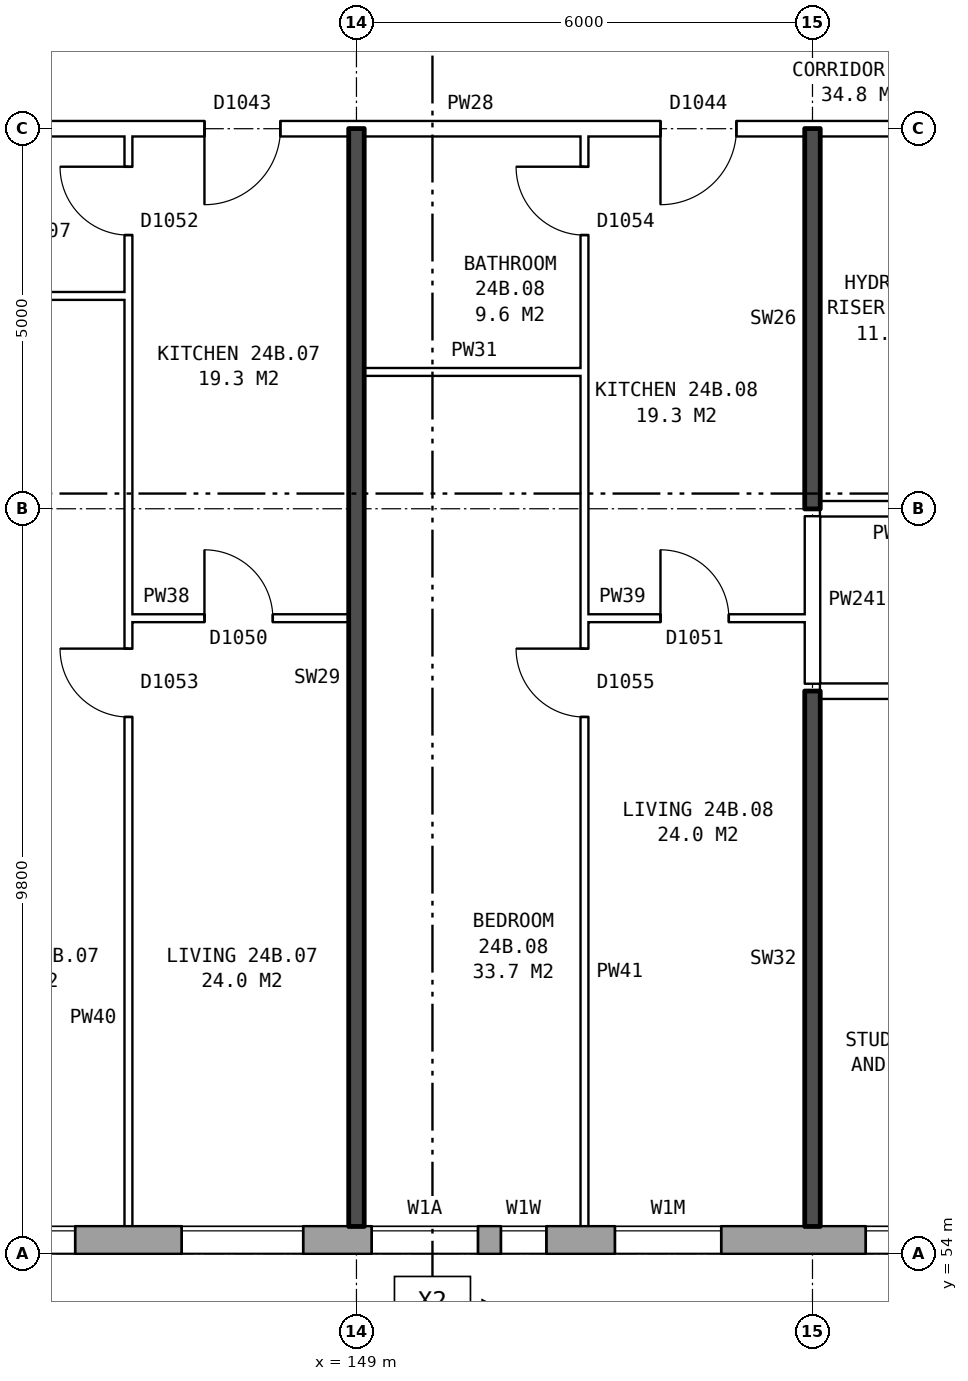
"""IFC4 building model, lengths in metres.
Left out: names, types, materials, properties, quantities, classifications, styles, units other than length and angle.
Written with IfcOpenShell. Run it as: python <this file> out.ifc"""

import sys

from ifc_helpers import new_model, si_unit, direction, frame, frame_2d, origin, place, context, subcontext, project, spatial, rectangle, extrude, element, fill, save


model = new_model("IFC4")
c1 = context("Model", 3, precision=1e-05, world=origin(), true_north=direction((0.0, 1.0)))
c2 = subcontext(c1, "Body", "Model", "MODEL_VIEW")
j1 = project(units=[si_unit("LENGTHUNIT", "METRE"), si_unit("PLANEANGLEUNIT", "RADIAN")], contexts=[c1])
p1 = place(None, origin())
s1 = spatial("IfcSite", under=j1, at=p1, CompositionType="ELEMENT")
p2 = place(p1, origin())
s2 = spatial("IfcBuilding", under=s1, at=p2, CompositionType="ELEMENT")
p3 = place(p2, frame((0.0, 0.0, 87.1)))
s3 = spatial("IfcBuildingStorey", under=s2, at=p3, CompositionType="ELEMENT", Elevation=87.1)
p4 = place(p3, frame((134.075, 54.18, 0.0), z_axis=(0.0, 0.0, 1.0), x_axis=(1.0, 0.0, 0.0)))
e1 = element("IfcWall", 1, at=p4, inside=s3, PredefinedType="STANDARD", context=c2, shape_type="SweptSolid", body=[
    extrude(rectangle(XDim=38.101, YDim=0.36, at=frame_2d((19.05, 0.0))), origin(), (0.0, 0.0, 1.0), 2.85),
])
p5 = place(p4, frame((0.625, 0.0, 0.8)))
e2 = element("IfcOpeningElement", 2, at=p5, cuts=e1, PredefinedType="OPENING", context=c2, shape_type="SweptSolid", body=[
    extrude(rectangle(XDim=1.6, YDim=1.8, at=frame_2d((0.8, 0.9))), frame((0.0, 0.19, 0.0), z_axis=(0.0, -1.0, 0.0), x_axis=(1.0, 0.0, 0.0)), (0.0, 0.0, 1.0), 0.38),
])
p6 = place(p4, frame((3.625, 0.0, 0.8)))
e3 = element("IfcOpeningElement", 3, at=p6, cuts=e1, PredefinedType="OPENING", context=c2, shape_type="SweptSolid", body=[
    extrude(rectangle(XDim=1.6, YDim=1.8, at=frame_2d((0.8, 0.9))), frame((0.0, 0.19, 0.0), z_axis=(0.0, -1.0, 0.0), x_axis=(1.0, 0.0, 0.0)), (0.0, 0.0, 1.0), 0.38),
])
p7 = place(p4, frame((6.625, 0.0, 0.8)))
e4 = element("IfcOpeningElement", 4, at=p7, cuts=e1, PredefinedType="OPENING", context=c2, shape_type="SweptSolid", body=[
    extrude(rectangle(XDim=1.6, YDim=1.8, at=frame_2d((0.8, 0.9))), frame((0.0, 0.19, 0.0), z_axis=(0.0, -1.0, 0.0), x_axis=(1.0, 0.0, 0.0)), (0.0, 0.0, 1.0), 0.38),
])
p8 = place(p4, frame((9.625, 0.0, 0.8)))
e5 = element("IfcOpeningElement", 5, at=p8, cuts=e1, PredefinedType="OPENING", context=c2, shape_type="SweptSolid", body=[
    extrude(rectangle(XDim=1.6, YDim=1.8, at=frame_2d((0.8, 0.9))), frame((0.0, 0.19, 0.0), z_axis=(0.0, -1.0, 0.0), x_axis=(1.0, 0.0, 0.0)), (0.0, 0.0, 1.0), 0.38),
])
p9 = place(p4, frame((12.625, 0.0, 0.8)))
e6 = element("IfcOpeningElement", 6, at=p9, cuts=e1, PredefinedType="OPENING", context=c2, shape_type="SweptSolid", body=[
    extrude(rectangle(XDim=1.6, YDim=1.8, at=frame_2d((0.8, 0.9))), frame((0.0, 0.19, 0.0), z_axis=(0.0, -1.0, 0.0), x_axis=(1.0, 0.0, 0.0)), (0.0, 0.0, 1.0), 0.38),
])
p10 = place(p4, frame((15.125, 0.0, 0.8)))
e7 = element("IfcOpeningElement", 7, at=p10, cuts=e1, PredefinedType="OPENING", context=c2, shape_type="SweptSolid", body=[
    extrude(rectangle(XDim=1.4, YDim=1.8, at=frame_2d((0.7, 0.9))), frame((0.0, 0.19, 0.0), z_axis=(0.0, -1.0, 0.0), x_axis=(1.0, 0.0, 0.0)), (0.0, 0.0, 1.0), 0.38),
])
p11 = place(p4, frame((18.325, 0.0, 0.15)))
e8 = element("IfcOpeningElement", 8, at=p11, cuts=e1, PredefinedType="OPENING", context=c2, shape_type="SweptSolid", body=[
    extrude(rectangle(XDim=1.4, YDim=1.2, at=frame_2d((0.7, 0.6))), frame((0.0, 0.19, 0.0), z_axis=(0.0, -1.0, 0.0), x_axis=(1.0, 0.0, 0.0)), (0.0, 0.0, 1.0), 0.38),
])
p12 = place(p4, frame((21.625, 0.0, 0.8)))
e9 = element("IfcOpeningElement", 9, at=p12, cuts=e1, PredefinedType="OPENING", context=c2, shape_type="SweptSolid", body=[
    extrude(rectangle(XDim=1.6, YDim=1.8, at=frame_2d((0.8, 0.9))), frame((0.0, 0.19, 0.0), z_axis=(0.0, -1.0, 0.0), x_axis=(1.0, 0.0, 0.0)), (0.0, 0.0, 1.0), 0.38),
])
p13 = place(p4, frame((24.625, 0.0, 0.8)))
e10 = element("IfcOpeningElement", 10, at=p13, cuts=e1, PredefinedType="OPENING", context=c2, shape_type="SweptSolid", body=[
    extrude(rectangle(XDim=1.6, YDim=1.8, at=frame_2d((0.8, 0.9))), frame((0.0, 0.19, 0.0), z_axis=(0.0, -1.0, 0.0), x_axis=(1.0, 0.0, 0.0)), (0.0, 0.0, 1.0), 0.38),
])
p14 = place(p4, frame((27.625, 0.0, 0.8)))
e11 = element("IfcOpeningElement", 11, at=p14, cuts=e1, PredefinedType="OPENING", context=c2, shape_type="SweptSolid", body=[
    extrude(rectangle(XDim=1.6, YDim=1.8, at=frame_2d((0.8, 0.9))), frame((0.0, 0.19, 0.0), z_axis=(0.0, -1.0, 0.0), x_axis=(1.0, 0.0, 0.0)), (0.0, 0.0, 1.0), 0.38),
])
p15 = place(p4, frame((30.625, 0.0, 0.8)))
e12 = element("IfcOpeningElement", 12, at=p15, cuts=e1, PredefinedType="OPENING", context=c2, shape_type="SweptSolid", body=[
    extrude(rectangle(XDim=1.6, YDim=1.8, at=frame_2d((0.8, 0.9))), frame((0.0, 0.19, 0.0), z_axis=(0.0, -1.0, 0.0), x_axis=(1.0, 0.0, 0.0)), (0.0, 0.0, 1.0), 0.38),
])
p16 = place(p4, frame((33.625, 0.0, 0.8)))
e13 = element("IfcOpeningElement", 13, at=p16, cuts=e1, PredefinedType="OPENING", context=c2, shape_type="SweptSolid", body=[
    extrude(rectangle(XDim=1.6, YDim=1.8, at=frame_2d((0.8, 0.9))), frame((0.0, 0.19, 0.0), z_axis=(0.0, -1.0, 0.0), x_axis=(1.0, 0.0, 0.0)), (0.0, 0.0, 1.0), 0.38),
])
p17 = place(p4, frame((16.825, 0.0, 1.7)))
e14 = element("IfcOpeningElement", 14, at=p17, cuts=e1, PredefinedType="OPENING", context=c2, shape_type="SweptSolid", body=[
    extrude(rectangle(XDim=0.6, YDim=0.9, at=frame_2d((0.3, 0.45))), frame((0.0, 0.19, 0.0), z_axis=(0.0, -1.0, 0.0), x_axis=(1.0, 0.0, 0.0)), (0.0, 0.0, 1.0), 0.38),
])
p18 = place(p3, frame((155.1, 61.4, 0.0), z_axis=(0.0, 0.0, 1.0), x_axis=(1.0, 0.0, 0.0)))
e15 = element("IfcWall", 15, at=p18, inside=s3, PredefinedType="PARTITIONING", context=c2, shape_type="SweptSolid", body=[
    extrude(rectangle(XDim=19.79, YDim=0.2, at=frame_2d((9.895, 0.0))), origin(), (0.0, 0.0, 1.0), 2.85),
])
p19 = place(p18, frame((1.45, 0.0, 0.0)))
e16 = element("IfcOpeningElement", 16, at=p19, cuts=e15, PredefinedType="OPENING", context=c2, shape_type="SweptSolid", body=[
    extrude(rectangle(XDim=1.0, YDim=2.1, at=frame_2d((0.5, 1.05))), frame((0.0, 0.11, 0.0), z_axis=(0.0, -1.0, 0.0), x_axis=(1.0, 0.0, 0.0)), (0.0, 0.0, 1.0), 0.22),
])
p20 = place(p18, frame((7.4, 0.0, 0.0)))
e17 = element("IfcOpeningElement", 17, at=p20, cuts=e15, PredefinedType="OPENING", context=c2, shape_type="SweptSolid", body=[
    extrude(rectangle(XDim=1.0, YDim=2.1, at=frame_2d((0.5, 1.05))), frame((0.0, 0.11, 0.0), z_axis=(0.0, -1.0, 0.0), x_axis=(1.0, 0.0, 0.0)), (0.0, 0.0, 1.0), 0.22),
])
p21 = place(p18, frame((13.2, 0.0, 0.0)))
e18 = element("IfcOpeningElement", 18, at=p21, cuts=e15, PredefinedType="OPENING", context=c2, shape_type="SweptSolid", body=[
    extrude(rectangle(XDim=1.0, YDim=2.1, at=frame_2d((0.5, 1.05))), frame((0.0, 0.11, 0.0), z_axis=(0.0, -1.0, 0.0), x_axis=(1.0, 0.0, 0.0)), (0.0, 0.0, 1.0), 0.22),
])
p22 = place(p3, frame((146.0, 62.36, 0.0), z_axis=(0.0, 0.0, 1.0), x_axis=(1.0, 0.0, 0.0)))
e19 = element("IfcWall", 19, at=p22, inside=s3, PredefinedType="PARTITIONING", context=c2, shape_type="SweptSolid", body=[
    extrude(rectangle(XDim=2.9, YDim=0.1, at=frame_2d((1.45, 0.0))), origin(), (0.0, 0.0, 1.0), 2.85),
])
p23 = place(p22, frame((1.0, 0.0, 0.0)))
e20 = element("IfcOpeningElement", 20, at=p23, cuts=e19, PredefinedType="OPENING", context=c2, shape_type="SweptSolid", body=[
    extrude(rectangle(XDim=0.9, YDim=2.1, at=frame_2d((0.45, 1.05))), frame((0.0, 0.06, 0.0), z_axis=(0.0, -1.0, 0.0), x_axis=(1.0, 0.0, 0.0)), (0.0, 0.0, 1.0), 0.12),
])
p24 = place(p3, frame((152.0, 62.36, 0.0), z_axis=(0.0, 0.0, 1.0), x_axis=(1.0, 0.0, 0.0)))
e21 = element("IfcWall", 21, at=p24, inside=s3, PredefinedType="PARTITIONING", context=c2, shape_type="SweptSolid", body=[
    extrude(rectangle(XDim=2.9, YDim=0.1, at=frame_2d((1.45, 0.0))), origin(), (0.0, 0.0, 1.0), 2.85),
])
p25 = place(p24, frame((1.0, 0.0, 0.0)))
e22 = element("IfcOpeningElement", 22, at=p25, cuts=e21, PredefinedType="OPENING", context=c2, shape_type="SweptSolid", body=[
    extrude(rectangle(XDim=0.9, YDim=2.1, at=frame_2d((0.45, 1.05))), frame((0.0, 0.06, 0.0), z_axis=(0.0, -1.0, 0.0), x_axis=(1.0, 0.0, 0.0)), (0.0, 0.0, 1.0), 0.12),
])
p26 = place(p3, frame((155.1, 63.8, 0.0), z_axis=(0.0, 0.0, 1.0), x_axis=(1.0, 0.0, 0.0)))
e23 = element("IfcWall", 23, at=p26, inside=s3, PredefinedType="PARTITIONING", context=c2, shape_type="SweptSolid", body=[
    extrude(rectangle(XDim=2.14, YDim=0.2, at=frame_2d((1.07, 0.0))), origin(), (0.0, 0.0, 1.0), 2.85),
])
p27 = place(p3, frame((149.1, 65.6, 0.0), z_axis=(0.0, 0.0, 1.0), x_axis=(1.0, 0.0, 0.0)))
e24 = element("IfcWall", 24, at=p27, inside=s3, PredefinedType="PARTITIONING", context=c2, shape_type="SweptSolid", body=[
    extrude(rectangle(XDim=2.9, YDim=0.1, at=frame_2d((1.45, 0.0))), origin(), (0.0, 0.0, 1.0), 2.85),
])
p28 = place(p3, frame((142.76, 66.6, 0.0), z_axis=(0.0, 0.0, 1.0), x_axis=(1.0, 0.0, 0.0)))
e25 = element("IfcWall", 25, at=p28, inside=s3, PredefinedType="PARTITIONING", context=c2, shape_type="SweptSolid", body=[
    extrude(rectangle(XDim=3.24, YDim=0.1, at=frame_2d((1.62, 0.0))), origin(), (0.0, 0.0, 1.0), 2.85),
])
p29 = place(p3, frame((142.76, 68.8, 0.0), z_axis=(0.0, 0.0, 1.0), x_axis=(1.0, 0.0, 0.0)))
e26 = element("IfcWall", 26, at=p29, inside=s3, PredefinedType="PARTITIONING", context=c2, shape_type="SweptSolid", body=[
    extrude(rectangle(XDim=14.48, YDim=0.2, at=frame_2d((7.24, 0.0))), origin(), (0.0, 0.0, 1.0), 2.85),
])
p30 = place(p29, frame((4.24, 0.0, 0.0)))
e27 = element("IfcOpeningElement", 27, at=p30, cuts=e26, PredefinedType="OPENING", context=c2, shape_type="SweptSolid", body=[
    extrude(rectangle(XDim=1.0, YDim=2.1, at=frame_2d((0.5, 1.05))), frame((0.0, 0.11, 0.0), z_axis=(0.0, -1.0, 0.0), x_axis=(1.0, 0.0, 0.0)), (0.0, 0.0, 1.0), 0.22),
])
p31 = place(p29, frame((10.24, 0.0, 0.0)))
e28 = element("IfcOpeningElement", 28, at=p31, cuts=e26, PredefinedType="OPENING", context=c2, shape_type="SweptSolid", body=[
    extrude(rectangle(XDim=1.0, YDim=2.1, at=frame_2d((0.5, 1.05))), frame((0.0, 0.11, 0.0), z_axis=(0.0, -1.0, 0.0), x_axis=(1.0, 0.0, 0.0)), (0.0, 0.0, 1.0), 0.22),
])
p32 = place(p3, frame((146.0, 54.36, 0.0), z_axis=(0.0, 0.0, 1.0), x_axis=(0.0, 1.0, 0.0)))
e29 = element("IfcWall", 29, at=p32, inside=s3, PredefinedType="PARTITIONING", context=c2, shape_type="SweptSolid", body=[
    extrude(rectangle(XDim=14.34, YDim=0.1, at=frame_2d((7.17, 0.0))), origin(), (0.0, 0.0, 1.0), 2.85),
])
p33 = place(p32, frame((6.7, 0.0, 0.0)))
e30 = element("IfcOpeningElement", 30, at=p33, cuts=e29, PredefinedType="OPENING", context=c2, shape_type="SweptSolid", body=[
    extrude(rectangle(XDim=0.9, YDim=2.1, at=frame_2d((0.45, 1.05))), frame((0.0, 0.06, 0.0), z_axis=(0.0, -1.0, 0.0), x_axis=(1.0, 0.0, 0.0)), (0.0, 0.0, 1.0), 0.12),
])
p34 = place(p32, frame((13.04, 0.0, 0.0)))
e31 = element("IfcOpeningElement", 31, at=p34, cuts=e29, PredefinedType="OPENING", context=c2, shape_type="SweptSolid", body=[
    extrude(rectangle(XDim=0.9, YDim=2.1, at=frame_2d((0.45, 1.05))), frame((0.0, 0.06, 0.0), z_axis=(0.0, -1.0, 0.0), x_axis=(1.0, 0.0, 0.0)), (0.0, 0.0, 1.0), 0.12),
])
p35 = place(p3, frame((149.0, 54.36, 0.0), z_axis=(0.0, 0.0, 1.0), x_axis=(0.0, 1.0, 0.0)))
e32 = element("IfcWall", 32, at=p35, inside=s3, PredefinedType="SOLIDWALL", context=c2, shape_type="SweptSolid", body=[
    extrude(rectangle(XDim=14.44, YDim=0.2, at=frame_2d((7.22, 0.0))), origin(), (0.0, 0.0, 1.0), 2.85),
])
p36 = place(p3, frame((152.0, 54.36, 0.0), z_axis=(0.0, 0.0, 1.0), x_axis=(0.0, 1.0, 0.0)))
e33 = element("IfcWall", 33, at=p36, inside=s3, PredefinedType="PARTITIONING", context=c2, shape_type="SweptSolid", body=[
    extrude(rectangle(XDim=14.34, YDim=0.1, at=frame_2d((7.17, 0.0))), origin(), (0.0, 0.0, 1.0), 2.85),
])
p37 = place(p36, frame((6.7, 0.0, 0.0)))
e34 = element("IfcOpeningElement", 34, at=p37, cuts=e33, PredefinedType="OPENING", context=c2, shape_type="SweptSolid", body=[
    extrude(rectangle(XDim=0.9, YDim=2.1, at=frame_2d((0.45, 1.05))), frame((0.0, 0.06, 0.0), z_axis=(0.0, -1.0, 0.0), x_axis=(1.0, 0.0, 0.0)), (0.0, 0.0, 1.0), 0.12),
])
p38 = place(p36, frame((13.04, 0.0, 0.0)))
e35 = element("IfcOpeningElement", 35, at=p38, cuts=e33, PredefinedType="OPENING", context=c2, shape_type="SweptSolid", body=[
    extrude(rectangle(XDim=0.9, YDim=2.1, at=frame_2d((0.45, 1.05))), frame((0.0, 0.06, 0.0), z_axis=(0.0, -1.0, 0.0), x_axis=(1.0, 0.0, 0.0)), (0.0, 0.0, 1.0), 0.12),
])
p39 = place(p3, frame((155.0, 54.36, 0.0), z_axis=(0.0, 0.0, 1.0), x_axis=(0.0, 1.0, 0.0)))
e36 = element("IfcWall", 36, at=p39, inside=s3, PredefinedType="SOLIDWALL", context=c2, shape_type="SweptSolid", body=[
    extrude(rectangle(XDim=7.04, YDim=0.2, at=frame_2d((3.52, 0.0))), origin(), (0.0, 0.0, 1.0), 2.85),
])
p40 = place(p3, frame((155.0, 61.5, 0.0), z_axis=(0.0, 0.0, 1.0), x_axis=(0.0, 1.0, 0.0)))
e37 = element("IfcWall", 37, at=p40, inside=s3, PredefinedType="PARTITIONING", context=c2, shape_type="SweptSolid", body=[
    extrude(rectangle(XDim=2.2, YDim=0.2, at=frame_2d((1.1, 0.0))), origin(), (0.0, 0.0, 1.0), 2.85),
])
p41 = place(p3, frame((155.0, 63.8, 0.0), z_axis=(0.0, 0.0, 1.0), x_axis=(0.0, 1.0, 0.0)))
e38 = element("IfcWall", 38, at=p41, inside=s3, PredefinedType="SOLIDWALL", context=c2, shape_type="SweptSolid", body=[
    extrude(rectangle(XDim=5.0, YDim=0.2, at=frame_2d((2.5, 0.0))), origin(), (0.0, 0.0, 1.0), 2.85),
])
p42 = place(p8, origin())
e39 = element("IfcWindow", 39, at=p42, inside=s3, PartitioningType="SINGLE_PANEL", PredefinedType="WINDOW", context=c2, shape_type="SweptSolid", body=[
    extrude(rectangle(XDim=1.6, YDim=1.8, at=frame_2d((0.8, 0.9))), frame((0.0, 0.15, 0.0), z_axis=(0.0, -1.0, 0.0), x_axis=(1.0, 0.0, 0.0)), (0.0, 0.0, 1.0), 0.06),
])
fill(e5, e39)
p43 = place(p9, origin())
e40 = element("IfcWindow", 40, at=p43, inside=s3, PartitioningType="SINGLE_PANEL", PredefinedType="WINDOW", context=c2, shape_type="SweptSolid", body=[
    extrude(rectangle(XDim=1.6, YDim=1.8, at=frame_2d((0.8, 0.9))), frame((0.0, 0.15, 0.0), z_axis=(0.0, -1.0, 0.0), x_axis=(1.0, 0.0, 0.0)), (0.0, 0.0, 1.0), 0.06),
])
fill(e6, e40)
p44 = place(p10, origin())
e41 = element("IfcWindow", 41, at=p44, inside=s3, PartitioningType="SINGLE_PANEL", PredefinedType="WINDOW", context=c2, shape_type="SweptSolid", body=[
    extrude(rectangle(XDim=1.4, YDim=1.8, at=frame_2d((0.7, 0.9))), frame((0.0, 0.15, 0.0), z_axis=(0.0, -1.0, 0.0), x_axis=(1.0, 0.0, 0.0)), (0.0, 0.0, 1.0), 0.06),
])
fill(e7, e41)
p45 = place(p11, origin())
e42 = element("IfcWindow", 42, at=p45, inside=s3, PartitioningType="SINGLE_PANEL", PredefinedType="WINDOW", context=c2, shape_type="SweptSolid", body=[
    extrude(rectangle(XDim=1.4, YDim=1.2, at=frame_2d((0.7, 0.6))), frame((0.0, 0.15, 0.0), z_axis=(0.0, -1.0, 0.0), x_axis=(1.0, 0.0, 0.0)), (0.0, 0.0, 1.0), 0.06),
])
fill(e8, e42)
p46 = place(p12, origin())
e43 = element("IfcWindow", 43, at=p46, inside=s3, PartitioningType="SINGLE_PANEL", PredefinedType="WINDOW", context=c2, shape_type="SweptSolid", body=[
    extrude(rectangle(XDim=1.6, YDim=1.8, at=frame_2d((0.8, 0.9))), frame((0.0, 0.15, 0.0), z_axis=(0.0, -1.0, 0.0), x_axis=(1.0, 0.0, 0.0)), (0.0, 0.0, 1.0), 0.06),
])
fill(e9, e43)
p47 = place(p33, origin())
e44 = element("IfcDoor", 44, at=p47, inside=s3, OperationType="SINGLE_SWING_RIGHT", PredefinedType="DOOR", context=c2, shape_type="SweptSolid", body=[
    extrude(rectangle(XDim=0.9, YDim=2.1, at=frame_2d((0.45, 1.05))), frame((0.0, 0.025, 0.0), z_axis=(0.0, -1.0, 0.0), x_axis=(1.0, 0.0, 0.0)), (0.0, 0.0, 1.0), 0.05),
])
fill(e30, e44)
p48 = place(p30, frame((1.0, 0.0, 0.0), z_axis=(0.0, 0.0, 1.0), x_axis=(-1.0, 0.0, 0.0)))
e45 = element("IfcDoor", 45, at=p48, inside=s3, OperationType="SINGLE_SWING_RIGHT", PredefinedType="DOOR", context=c2, shape_type="SweptSolid", body=[
    extrude(rectangle(XDim=1.0, YDim=2.1, at=frame_2d((0.5, 1.05))), frame((0.0, 0.025, 0.0), z_axis=(0.0, -1.0, 0.0), x_axis=(1.0, 0.0, 0.0)), (0.0, 0.0, 1.0), 0.05),
])
fill(e27, e45)
p49 = place(p23, origin())
e46 = element("IfcDoor", 46, at=p49, inside=s3, OperationType="SINGLE_SWING_LEFT", PredefinedType="DOOR", context=c2, shape_type="SweptSolid", body=[
    extrude(rectangle(XDim=0.9, YDim=2.1, at=frame_2d((0.45, 1.05))), frame((0.0, 0.025, 0.0), z_axis=(0.0, -1.0, 0.0), x_axis=(1.0, 0.0, 0.0)), (0.0, 0.0, 1.0), 0.05),
])
fill(e20, e46)
p50 = place(p34, origin())
e47 = element("IfcDoor", 47, at=p50, inside=s3, OperationType="SINGLE_SWING_RIGHT", PredefinedType="DOOR", context=c2, shape_type="SweptSolid", body=[
    extrude(rectangle(XDim=0.9, YDim=2.1, at=frame_2d((0.45, 1.05))), frame((0.0, 0.025, 0.0), z_axis=(0.0, -1.0, 0.0), x_axis=(1.0, 0.0, 0.0)), (0.0, 0.0, 1.0), 0.05),
])
fill(e31, e47)
p51 = place(p37, origin())
e48 = element("IfcDoor", 48, at=p51, inside=s3, OperationType="SINGLE_SWING_RIGHT", PredefinedType="DOOR", context=c2, shape_type="SweptSolid", body=[
    extrude(rectangle(XDim=0.9, YDim=2.1, at=frame_2d((0.45, 1.05))), frame((0.0, 0.025, 0.0), z_axis=(0.0, -1.0, 0.0), x_axis=(1.0, 0.0, 0.0)), (0.0, 0.0, 1.0), 0.05),
])
fill(e34, e48)
p52 = place(p31, frame((1.0, 0.0, 0.0), z_axis=(0.0, 0.0, 1.0), x_axis=(-1.0, 0.0, 0.0)))
e49 = element("IfcDoor", 49, at=p52, inside=s3, OperationType="SINGLE_SWING_RIGHT", PredefinedType="DOOR", context=c2, shape_type="SweptSolid", body=[
    extrude(rectangle(XDim=1.0, YDim=2.1, at=frame_2d((0.5, 1.05))), frame((0.0, 0.025, 0.0), z_axis=(0.0, -1.0, 0.0), x_axis=(1.0, 0.0, 0.0)), (0.0, 0.0, 1.0), 0.05),
])
fill(e28, e49)
p53 = place(p25, origin())
e50 = element("IfcDoor", 50, at=p53, inside=s3, OperationType="SINGLE_SWING_LEFT", PredefinedType="DOOR", context=c2, shape_type="SweptSolid", body=[
    extrude(rectangle(XDim=0.9, YDim=2.1, at=frame_2d((0.45, 1.05))), frame((0.0, 0.025, 0.0), z_axis=(0.0, -1.0, 0.0), x_axis=(1.0, 0.0, 0.0)), (0.0, 0.0, 1.0), 0.05),
])
fill(e22, e50)
p54 = place(p38, origin())
e51 = element("IfcDoor", 51, at=p54, inside=s3, OperationType="SINGLE_SWING_RIGHT", PredefinedType="DOOR", context=c2, shape_type="SweptSolid", body=[
    extrude(rectangle(XDim=0.9, YDim=2.1, at=frame_2d((0.45, 1.05))), frame((0.0, 0.025, 0.0), z_axis=(0.0, -1.0, 0.0), x_axis=(1.0, 0.0, 0.0)), (0.0, 0.0, 1.0), 0.05),
])
fill(e35, e51)
p55 = place(p17, origin())
e52 = element("IfcWindow", 52, at=p55, inside=s3, PartitioningType="SINGLE_PANEL", PredefinedType="WINDOW", context=c2, shape_type="SweptSolid", body=[
    extrude(rectangle(XDim=0.6, YDim=0.9, at=frame_2d((0.3, 0.45))), frame((0.0, 0.15, 0.0), z_axis=(0.0, -1.0, 0.0), x_axis=(1.0, 0.0, 0.0)), (0.0, 0.0, 1.0), 0.06),
])
fill(e14, e52)
save(model, sys.argv[1])
